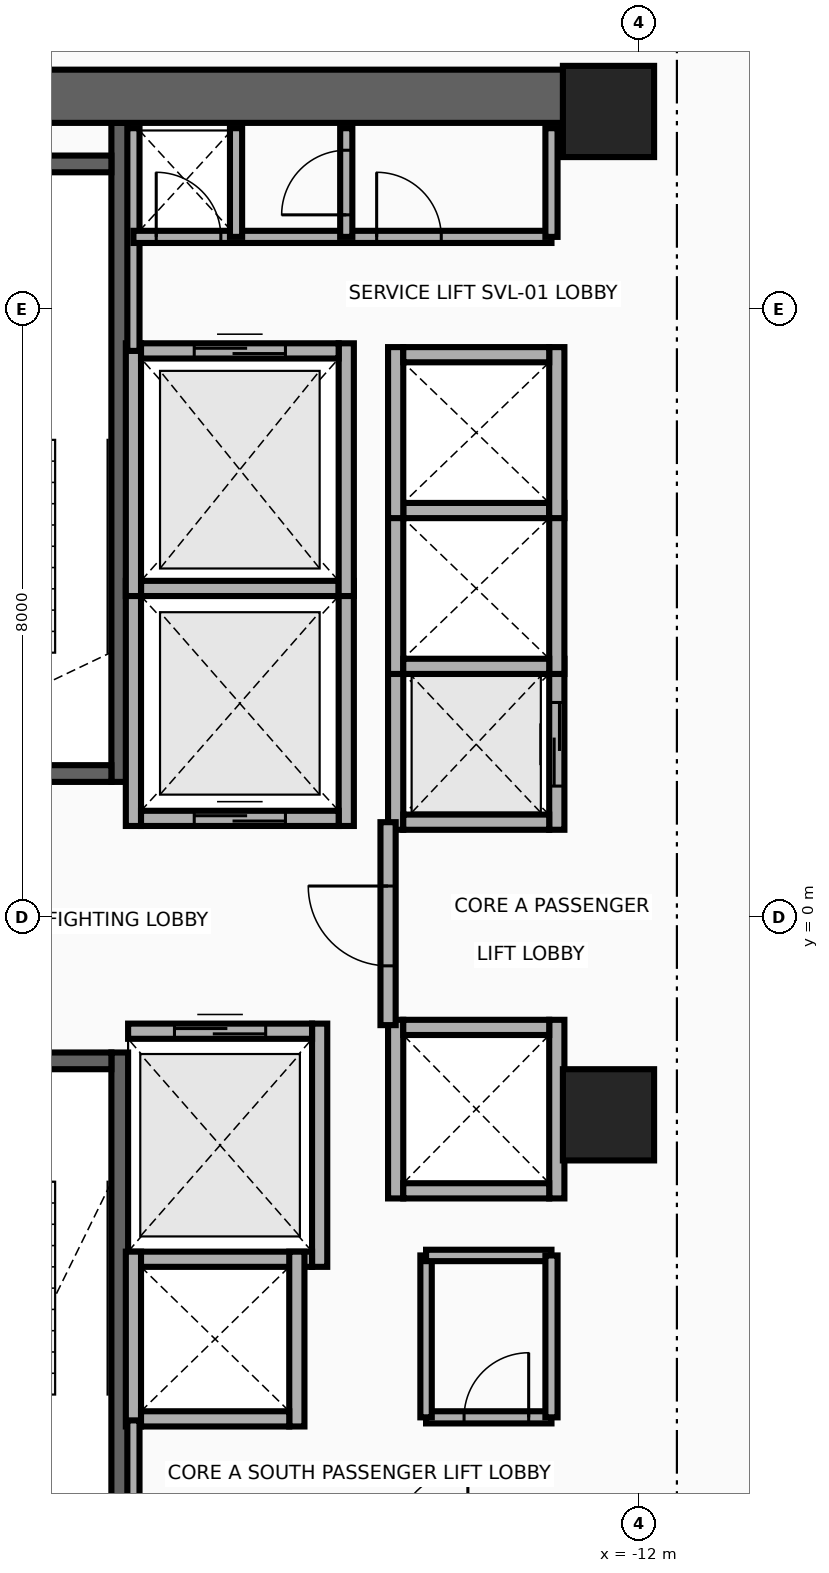
"""IFC4 building model, lengths in metres.
Left out: names, types, materials, properties, quantities, classifications, styles, units other than length and angle.
Written with IfcOpenShell. Run it as: python <this file> out.ifc"""

import sys

from ifc_helpers import new_model, si_unit, direction, frame, frame_2d, origin, origin_2d, place, context, subcontext, project, spatial, rectangle, extrude, source, transform, mapped, element, fill, save


model = new_model("IFC4")
c1 = context("Model", 3, precision=1e-05, world=origin(), true_north=direction((0.0, 1.0)))
c2 = subcontext(c1, "Body", "Model", "MODEL_VIEW")
j1 = project(units=[si_unit("LENGTHUNIT", "METRE"), si_unit("PLANEANGLEUNIT", "RADIAN")], contexts=[c1])
p1 = place(None, origin())
s1 = spatial("IfcSite", under=j1, at=p1, CompositionType="ELEMENT")
p2 = place(p1, origin())
s2 = spatial("IfcBuilding", under=s1, at=p2, CompositionType="ELEMENT")
p3 = place(p2, frame((0.0, 0.0, 150.1)))
s3 = spatial("IfcBuildingStorey", under=s2, at=p3, CompositionType="ELEMENT", Elevation=150.1)
p4 = place(p3, frame((-18.83, 1.78, 0.0), z_axis=(0.0, 0.0, 1.0), x_axis=(0.0, 1.0, 0.0)))
e1 = element("IfcWall", 1, at=p4, inside=s3, PredefinedType="SHEAR", context=c2, shape_type="SweptSolid", body=[
    extrude(rectangle(XDim=8.67, YDim=0.22, at=frame_2d((4.335, 0.0))), origin(), (0.0, 0.0, 1.0), 3.46),
])
p5 = place(p3, frame((-22.05, 1.89, 0.0), z_axis=(0.0, 0.0, 1.0), x_axis=(1.0, 0.0, 0.0)))
e2 = element("IfcWall", 2, at=p5, inside=s3, PredefinedType="SHEAR", context=c2, shape_type="SweptSolid", body=[
    extrude(rectangle(XDim=3.11, YDim=0.22, at=frame_2d((1.555, 0.0))), origin(), (0.0, 0.0, 1.0), 3.46),
])
p6 = place(p5, frame((1.0, 0.0, 0.0)))
e3 = element("IfcOpeningElement", 3, at=p6, cuts=e2, PredefinedType="OPENING", context=c2, shape_type="SweptSolid", body=[
    extrude(rectangle(XDim=1.1, YDim=2.15, at=frame_2d((0.55, 1.075))), frame((0.0, 0.125, 0.0), z_axis=(0.0, -1.0, 0.0), x_axis=(1.0, 0.0, 0.0)), (0.0, 0.0, 1.0), 0.25),
])
p7 = place(p3, frame((-22.05, 9.91, 0.0), z_axis=(0.0, 0.0, 1.0), x_axis=(1.0, 0.0, 0.0)))
e4 = element("IfcWall", 4, at=p7, inside=s3, PredefinedType="SHEAR", context=c2, shape_type="SweptSolid", body=[
    extrude(rectangle(XDim=3.11, YDim=0.22, at=frame_2d((1.555, 0.0))), origin(), (0.0, 0.0, 1.0), 3.46),
])
p8 = place(p3, frame((-18.83, -10.45, 0.0), z_axis=(0.0, 0.0, 1.0), x_axis=(0.0, 1.0, 0.0)))
e5 = element("IfcWall", 5, at=p8, inside=s3, PredefinedType="SHEAR", context=c2, shape_type="SweptSolid", body=[
    extrude(rectangle(XDim=8.67, YDim=0.22, at=frame_2d((4.335, 0.0))), origin(), (0.0, 0.0, 1.0), 3.46),
])
p9 = place(p3, frame((-22.05, -1.89, 0.0), z_axis=(0.0, 0.0, 1.0), x_axis=(1.0, 0.0, 0.0)))
e6 = element("IfcWall", 6, at=p9, inside=s3, PredefinedType="SHEAR", context=c2, shape_type="SweptSolid", body=[
    extrude(rectangle(XDim=3.11, YDim=0.22, at=frame_2d((1.555, 0.0))), origin(), (0.0, 0.0, 1.0), 3.46),
])
p10 = place(p9, frame((1.0, 0.0, 0.0)))
e7 = element("IfcOpeningElement", 7, at=p10, cuts=e6, PredefinedType="OPENING", context=c2, shape_type="SweptSolid", body=[
    extrude(rectangle(XDim=1.1, YDim=2.15, at=frame_2d((0.55, 1.075))), frame((0.0, 0.125, 0.0), z_axis=(0.0, -1.0, 0.0), x_axis=(1.0, 0.0, 0.0)), (0.0, 0.0, 1.0), 0.25),
])
p11 = place(p3, frame((-22.65, 10.8, 0.0), z_axis=(0.0, 0.0, 1.0), x_axis=(1.0, 0.0, 0.0)))
e8 = element("IfcWall", 8, at=p11, inside=s3, PredefinedType="SHEAR", context=c2, shape_type="SweptSolid", body=[
    extrude(rectangle(XDim=10.25, YDim=0.7, at=frame_2d((5.125, 0.0))), origin(), (0.0, 0.0, 1.0), 3.46),
])
m1 = source(origin(), c2, "Body", "SweptSolid", [
    extrude(rectangle(XDim=1.2, YDim=1.2, at=origin_2d()), origin(), (0.0, 0.0, 1.0), 3.7),
])
for number, where, z_axis, x_axis in (
    (9, (-12.4, -2.6, 0.0), (0.0, 0.0, 1.0), (1.0, 0.0, 0.0)),
    (10, (-12.4, 10.6, 0.0), (0.0, 0.0, 1.0), (1.0, 0.0, 0.0)),
):
    element("IfcColumn", number, at=place(p3, frame(where, z_axis=z_axis, x_axis=x_axis)), inside=s3, PredefinedType="COLUMN", context=c2, shape_type="MappedRepresentation", body=[
        mapped(m1, transform((0.0, 0.0, 0.0), x_axis=(1.0, 0.0, 0.0), y_axis=(0.0, 1.0, 0.0), z_axis=(0.0, 0.0, 1.0), scale=1.0)),
    ])
for number, where, z_axis, x_axis in (
    (11, (-18.65, 1.2, 0.0), (0.0, 0.0, 1.0), (0.0, 1.0, 0.0)),
    (12, (-15.85, 1.2, 0.0), (0.0, 0.0, 1.0), (0.0, 1.0, 0.0)),
):
    element("IfcWall", number, at=place(p3, frame(where, z_axis=z_axis, x_axis=x_axis)), inside=s3, PredefinedType="MOVABLE", context=c2, shape_type="SweptSolid", body=[
        extrude(rectangle(XDim=3.225, YDim=0.2, at=frame_2d((1.613, 0.0))), origin(), (0.0, 0.0, 1.0), 3.46),
    ])
p12 = place(p3, frame((-18.55, 1.3, 0.0), z_axis=(0.0, 0.0, 1.0), x_axis=(1.0, 0.0, 0.0)))
e13 = element("IfcWall", 13, at=p12, inside=s3, PredefinedType="MOVABLE", context=c2, shape_type="SweptSolid", body=[
    extrude(rectangle(XDim=2.6, YDim=0.2, at=frame_2d((1.3, 0.0))), origin(), (0.0, 0.0, 1.0), 3.46),
])
p13 = place(p12, frame((0.7, 0.0, 0.0)))
e14 = element("IfcOpeningElement", 14, at=p13, cuts=e13, PredefinedType="OPENING", context=c2, shape_type="SweptSolid", body=[
    extrude(rectangle(XDim=1.2, YDim=2.1, at=frame_2d((0.6, 1.05))), frame((0.0, 0.115, 0.0), z_axis=(0.0, -1.0, 0.0), x_axis=(1.0, 0.0, 0.0)), (0.0, 0.0, 1.0), 0.23),
])
p14 = place(p3, frame((-18.55, 4.325, 0.0), z_axis=(0.0, 0.0, 1.0), x_axis=(1.0, 0.0, 0.0)))
e15 = element("IfcWall", 15, at=p14, inside=s3, PredefinedType="MOVABLE", context=c2, shape_type="SweptSolid", body=[
    extrude(rectangle(XDim=2.6, YDim=0.2, at=frame_2d((1.3, 0.0))), origin(), (0.0, 0.0, 1.0), 3.46),
])
p15 = place(p3, frame((-16.2, -4.6, 0.0), z_axis=(0.0, 0.0, 1.0), x_axis=(0.0, 1.0, 0.0)))
e16 = element("IfcWall", 16, at=p15, inside=s3, PredefinedType="MOVABLE", context=c2, shape_type="SweptSolid", body=[
    extrude(rectangle(XDim=3.2, YDim=0.2, at=frame_2d((1.6, 0.0))), origin(), (0.0, 0.0, 1.0), 3.46),
])
p16 = place(p3, frame((-18.72, -4.5, 0.0), z_axis=(0.0, 0.0, 1.0), x_axis=(1.0, 0.0, 0.0)))
e17 = element("IfcWall", 17, at=p16, inside=s3, PredefinedType="MOVABLE", context=c2, shape_type="SweptSolid", body=[
    extrude(rectangle(XDim=2.42, YDim=0.2, at=frame_2d((1.21, 0.0))), origin(), (0.0, 0.0, 1.0), 3.46),
])
p17 = place(p3, frame((-18.72, -1.5, 0.0), z_axis=(0.0, 0.0, 1.0), x_axis=(1.0, 0.0, 0.0)))
e18 = element("IfcWall", 18, at=p17, inside=s3, PredefinedType="MOVABLE", context=c2, shape_type="SweptSolid", body=[
    extrude(rectangle(XDim=2.42, YDim=0.2, at=frame_2d((1.21, 0.0))), origin(), (0.0, 0.0, 1.0), 3.46),
])
p18 = place(p17, frame((0.61, 0.0, 0.0)))
e19 = element("IfcOpeningElement", 19, at=p18, cuts=e18, PredefinedType="OPENING", context=c2, shape_type="SweptSolid", body=[
    extrude(rectangle(XDim=1.2, YDim=2.1, at=frame_2d((0.6, 1.05))), frame((0.0, 0.115, 0.0), z_axis=(0.0, -1.0, 0.0), x_axis=(1.0, 0.0, 0.0)), (0.0, 0.0, 1.0), 0.23),
])
for number, where, z_axis, x_axis in (
    (20, (-18.65, 4.225, 0.0), (0.0, 0.0, 1.0), (0.0, 1.0, 0.0)),
    (21, (-15.85, 4.225, 0.0), (0.0, 0.0, 1.0), (0.0, 1.0, 0.0)),
):
    element("IfcWall", number, at=place(p3, frame(where, z_axis=z_axis, x_axis=x_axis)), inside=s3, PredefinedType="MOVABLE", context=c2, shape_type="SweptSolid", body=[
        extrude(rectangle(XDim=3.325, YDim=0.2, at=frame_2d((1.663, 0.0))), origin(), (0.0, 0.0, 1.0), 3.46),
    ])
p19 = place(p3, frame((-18.55, 7.45, 0.0), z_axis=(0.0, 0.0, 1.0), x_axis=(1.0, 0.0, 0.0)))
e22 = element("IfcWall", 22, at=p19, inside=s3, PredefinedType="MOVABLE", context=c2, shape_type="SweptSolid", body=[
    extrude(rectangle(XDim=2.6, YDim=0.2, at=frame_2d((1.3, 0.0))), origin(), (0.0, 0.0, 1.0), 3.46),
])
p20 = place(p19, frame((0.7, 0.0, 0.0)))
e23 = element("IfcOpeningElement", 23, at=p20, cuts=e22, PredefinedType="OPENING", context=c2, shape_type="SweptSolid", body=[
    extrude(rectangle(XDim=1.2, YDim=2.1, at=frame_2d((0.6, 1.05))), frame((0.0, 0.115, 0.0), z_axis=(0.0, -1.0, 0.0), x_axis=(1.0, 0.0, 0.0)), (0.0, 0.0, 1.0), 0.23),
])
p21 = place(p3, frame((-15.2, 1.15, 0.0), z_axis=(0.0, 0.0, 1.0), x_axis=(0.0, 1.0, 0.0)))
e24 = element("IfcWall", 24, at=p21, inside=s3, PredefinedType="MOVABLE", context=c2, shape_type="SweptSolid", body=[
    extrude(rectangle(XDim=2.25, YDim=0.2, at=frame_2d((1.125, 0.0))), origin(), (0.0, 0.0, 1.0), 3.46),
])
p22 = place(p3, frame((-13.08, 1.15, 0.0), z_axis=(0.0, 0.0, 1.0), x_axis=(0.0, 1.0, 0.0)))
e25 = element("IfcWall", 25, at=p22, inside=s3, PredefinedType="MOVABLE", context=c2, shape_type="SweptSolid", body=[
    extrude(rectangle(XDim=2.25, YDim=0.2, at=frame_2d((1.125, 0.0))), origin(), (0.0, 0.0, 1.0), 3.46),
])
p23 = place(p22, frame((0.575, 0.0, 0.0)))
e26 = element("IfcOpeningElement", 26, at=p23, cuts=e25, PredefinedType="OPENING", context=c2, shape_type="SweptSolid", body=[
    extrude(rectangle(XDim=1.1, YDim=2.1, at=frame_2d((0.55, 1.05))), frame((0.0, 0.115, 0.0), z_axis=(0.0, -1.0, 0.0), x_axis=(1.0, 0.0, 0.0)), (0.0, 0.0, 1.0), 0.23),
])
p24 = place(p3, frame((-15.1, 1.25, 0.0), z_axis=(0.0, 0.0, 1.0), x_axis=(1.0, 0.0, 0.0)))
e27 = element("IfcWall", 27, at=p24, inside=s3, PredefinedType="MOVABLE", context=c2, shape_type="SweptSolid", body=[
    extrude(rectangle(XDim=1.92, YDim=0.2, at=frame_2d((0.96, 0.0))), origin(), (0.0, 0.0, 1.0), 3.46),
])
for number, where, z_axis, x_axis in (
    (28, (-15.2, 3.2, 0.0), (0.0, 0.0, 1.0), (0.0, 1.0, 0.0)),
    (29, (-13.08, 3.2, 0.0), (0.0, 0.0, 1.0), (0.0, 1.0, 0.0)),
):
    element("IfcWall", number, at=place(p3, frame(where, z_axis=z_axis, x_axis=x_axis)), inside=s3, PredefinedType="MOVABLE", context=c2, shape_type="SweptSolid", body=[
        extrude(rectangle(XDim=2.25, YDim=0.2, at=frame_2d((1.125, 0.0))), origin(), (0.0, 0.0, 1.0), 3.46),
    ])
for number, where, z_axis, x_axis in (
    (30, (-15.1, 3.3, 0.0), (0.0, 0.0, 1.0), (1.0, 0.0, 0.0)),
    (31, (-15.1, 5.35, 0.0), (0.0, 0.0, 1.0), (1.0, 0.0, 0.0)),
):
    element("IfcWall", number, at=place(p3, frame(where, z_axis=z_axis, x_axis=x_axis)), inside=s3, PredefinedType="MOVABLE", context=c2, shape_type="SweptSolid", body=[
        extrude(rectangle(XDim=1.92, YDim=0.2, at=frame_2d((0.96, 0.0))), origin(), (0.0, 0.0, 1.0), 3.46),
    ])
for number, where, z_axis, x_axis in (
    (32, (-15.2, 5.25, 0.0), (0.0, 0.0, 1.0), (0.0, 1.0, 0.0)),
    (33, (-13.08, 5.25, 0.0), (0.0, 0.0, 1.0), (0.0, 1.0, 0.0)),
):
    element("IfcWall", number, at=place(p3, frame(where, z_axis=z_axis, x_axis=x_axis)), inside=s3, PredefinedType="MOVABLE", context=c2, shape_type="SweptSolid", body=[
        extrude(rectangle(XDim=2.25, YDim=0.2, at=frame_2d((1.125, 0.0))), origin(), (0.0, 0.0, 1.0), 3.46),
    ])
p25 = place(p3, frame((-15.1, 7.4, 0.0), z_axis=(0.0, 0.0, 1.0), x_axis=(1.0, 0.0, 0.0)))
e34 = element("IfcWall", 34, at=p25, inside=s3, PredefinedType="MOVABLE", context=c2, shape_type="SweptSolid", body=[
    extrude(rectangle(XDim=1.92, YDim=0.2, at=frame_2d((0.96, 0.0))), origin(), (0.0, 0.0, 1.0), 3.46),
])
for number, where, z_axis, x_axis in (
    (35, (-18.65, -6.7, 0.0), (0.0, 0.0, 1.0), (0.0, 1.0, 0.0)),
    (36, (-16.5, -6.7, 0.0), (0.0, 0.0, 1.0), (0.0, 1.0, 0.0)),
):
    element("IfcWall", number, at=place(p3, frame(where, z_axis=z_axis, x_axis=x_axis)), inside=s3, PredefinedType="MOVABLE", context=c2, shape_type="SweptSolid", body=[
        extrude(rectangle(XDim=2.3, YDim=0.2, at=frame_2d((1.15, 0.0))), origin(), (0.0, 0.0, 1.0), 3.46),
    ])
p26 = place(p3, frame((-18.55, -6.6, 0.0), z_axis=(0.0, 0.0, 1.0), x_axis=(1.0, 0.0, 0.0)))
e37 = element("IfcWall", 37, at=p26, inside=s3, PredefinedType="MOVABLE", context=c2, shape_type="SweptSolid", body=[
    extrude(rectangle(XDim=1.95, YDim=0.2, at=frame_2d((0.975, 0.0))), origin(), (0.0, 0.0, 1.0), 3.46),
])
for number, where, z_axis, x_axis in (
    (38, (-15.2, -3.7, 0.0), (0.0, 0.0, 1.0), (0.0, 1.0, 0.0)),
    (39, (-13.08, -3.7, 0.0), (0.0, 0.0, 1.0), (0.0, 1.0, 0.0)),
):
    element("IfcWall", number, at=place(p3, frame(where, z_axis=z_axis, x_axis=x_axis)), inside=s3, PredefinedType="MOVABLE", context=c2, shape_type="SweptSolid", body=[
        extrude(rectangle(XDim=2.35, YDim=0.2, at=frame_2d((1.175, 0.0))), origin(), (0.0, 0.0, 1.0), 3.46),
    ])
for number, where, z_axis, x_axis in (
    (40, (-15.1, -3.6, 0.0), (0.0, 0.0, 1.0), (1.0, 0.0, 0.0)),
    (41, (-15.1, -1.45, 0.0), (0.0, 0.0, 1.0), (1.0, 0.0, 0.0)),
):
    element("IfcWall", number, at=place(p3, frame(where, z_axis=z_axis, x_axis=x_axis)), inside=s3, PredefinedType="MOVABLE", context=c2, shape_type="SweptSolid", body=[
        extrude(rectangle(XDim=1.92, YDim=0.2, at=frame_2d((0.96, 0.0))), origin(), (0.0, 0.0, 1.0), 3.46),
    ])
p27 = place(p3, frame((-15.3, -1.42, 0.0), z_axis=(0.0, 0.0, 1.0), x_axis=(0.0, 1.0, 0.0)))
e42 = element("IfcWall", 42, at=p27, inside=s3, PredefinedType="PARTITIONING", context=c2, shape_type="SweptSolid", body=[
    extrude(rectangle(XDim=2.67, YDim=0.2, at=frame_2d((1.335, 0.0))), origin(), (0.0, 0.0, 1.0), 3.46),
])
p28 = place(p27, frame((0.78, 0.0, 0.0)))
e43 = element("IfcOpeningElement", 43, at=p28, cuts=e42, PredefinedType="OPENING", context=c2, shape_type="SweptSolid", body=[
    extrude(rectangle(XDim=1.05, YDim=2.15, at=frame_2d((0.525, 1.075))), frame((0.0, 0.115, 0.0), z_axis=(0.0, -1.0, 0.0), x_axis=(1.0, 0.0, 0.0)), (0.0, 0.0, 1.0), 0.23),
])
p29 = place(p3, frame((-18.65, 7.45, 0.0), z_axis=(0.0, 0.0, 1.0), x_axis=(0.0, 1.0, 0.0)))
e44 = element("IfcWall", 44, at=p29, inside=s3, PredefinedType="PARTITIONING", context=c2, shape_type="SweptSolid", body=[
    extrude(rectangle(XDim=2.93, YDim=0.16, at=frame_2d((1.465, 0.0))), origin(), (0.0, 0.0, 1.0), 3.46),
])
p30 = place(p3, frame((-18.65, -8.18, 0.0), z_axis=(0.0, 0.0, 1.0), x_axis=(0.0, 1.0, 0.0)))
e45 = element("IfcWall", 45, at=p30, inside=s3, PredefinedType="PARTITIONING", context=c2, shape_type="SweptSolid", body=[
    extrude(rectangle(XDim=1.56, YDim=0.16, at=frame_2d((0.78, 0.0))), origin(), (0.0, 0.0, 1.0), 3.46),
])
p31 = place(p3, frame((-18.65, 8.95, 0.0), z_axis=(0.0, 0.0, 1.0), x_axis=(1.0, 0.0, 0.0)))
e46 = element("IfcWall", 46, at=p31, inside=s3, PredefinedType="PARTITIONING", context=c2, shape_type="SweptSolid", body=[
    extrude(rectangle(XDim=5.5, YDim=0.16, at=frame_2d((2.75, 0.0))), origin(), (0.0, 0.0, 1.0), 3.46),
])
p32 = place(p31, frame((0.3, 0.0, 0.0)))
e47 = element("IfcOpeningElement", 47, at=p32, cuts=e46, PredefinedType="OPENING", context=c2, shape_type="SweptSolid", body=[
    extrude(rectangle(XDim=0.85, YDim=2.05, at=frame_2d((0.425, 1.025))), frame((0.0, 0.095, 0.0), z_axis=(0.0, -1.0, 0.0), x_axis=(1.0, 0.0, 0.0)), (0.0, 0.0, 1.0), 0.19),
])
p33 = place(p31, frame((3.2, 0.0, 0.0)))
e48 = element("IfcOpeningElement", 48, at=p33, cuts=e46, PredefinedType="OPENING", context=c2, shape_type="SweptSolid", body=[
    extrude(rectangle(XDim=0.85, YDim=2.05, at=frame_2d((0.425, 1.025))), frame((0.0, 0.095, 0.0), z_axis=(0.0, -1.0, 0.0), x_axis=(1.0, 0.0, 0.0)), (0.0, 0.0, 1.0), 0.19),
])
for number, where, z_axis, x_axis in (
    (49, (-13.15, 8.95, 0.0), (0.0, 0.0, 1.0), (0.0, 1.0, 0.0)),
    (50, (-17.3, 8.95, 0.0), (0.0, 0.0, 1.0), (0.0, 1.0, 0.0)),
):
    element("IfcWall", number, at=place(p3, frame(where, z_axis=z_axis, x_axis=x_axis)), inside=s3, PredefinedType="PARTITIONING", context=c2, shape_type="SweptSolid", body=[
        extrude(rectangle(XDim=1.43, YDim=0.16, at=frame_2d((0.715, 0.0))), origin(), (0.0, 0.0, 1.0), 3.46),
    ])
p34 = place(p3, frame((-15.85, 8.95, 0.0), z_axis=(0.0, 0.0, 1.0), x_axis=(0.0, 1.0, 0.0)))
e51 = element("IfcWall", 51, at=p34, inside=s3, PredefinedType="PARTITIONING", context=c2, shape_type="SweptSolid", body=[
    extrude(rectangle(XDim=1.43, YDim=0.16, at=frame_2d((0.715, 0.0))), origin(), (0.0, 0.0, 1.0), 3.46),
])
p35 = place(p34, frame((0.29, 0.0, 0.0)))
e52 = element("IfcOpeningElement", 52, at=p35, cuts=e51, PredefinedType="OPENING", context=c2, shape_type="SweptSolid", body=[
    extrude(rectangle(XDim=0.85, YDim=2.05, at=frame_2d((0.425, 1.025))), frame((0.0, 0.095, 0.0), z_axis=(0.0, -1.0, 0.0), x_axis=(1.0, 0.0, 0.0)), (0.0, 0.0, 1.0), 0.19),
])
p36 = place(p3, frame((-14.8, -6.58, 0.0), z_axis=(0.0, 0.0, 1.0), x_axis=(1.0, 0.0, 0.0)))
e53 = element("IfcWall", 53, at=p36, inside=s3, PredefinedType="PARTITIONING", context=c2, shape_type="SweptSolid", body=[
    extrude(rectangle(XDim=1.65, YDim=0.16, at=frame_2d((0.825, 0.0))), origin(), (0.0, 0.0, 1.0), 3.46),
])
p37 = place(p36, frame((0.5, 0.0, 0.0)))
e54 = element("IfcOpeningElement", 54, at=p37, cuts=e53, PredefinedType="OPENING", context=c2, shape_type="SweptSolid", body=[
    extrude(rectangle(XDim=0.85, YDim=2.05, at=frame_2d((0.425, 1.025))), frame((0.0, 0.095, 0.0), z_axis=(0.0, -1.0, 0.0), x_axis=(1.0, 0.0, 0.0)), (0.0, 0.0, 1.0), 0.19),
])
p38 = place(p3, frame((-14.8, -6.58, 0.0), z_axis=(0.0, 0.0, 1.0), x_axis=(0.0, 1.0, 0.0)))
e55 = element("IfcWall", 55, at=p38, inside=s3, PredefinedType="PARTITIONING", context=c2, shape_type="SweptSolid", body=[
    extrude(rectangle(XDim=2.13, YDim=0.15, at=frame_2d((1.065, 0.0))), origin(), (0.0, 0.0, 1.0), 3.46),
])
p39 = place(p3, frame((-14.8, -4.45, 0.0), z_axis=(0.0, 0.0, 1.0), x_axis=(1.0, 0.0, 0.0)))
e56 = element("IfcWall", 56, at=p39, inside=s3, PredefinedType="PARTITIONING", context=c2, shape_type="SweptSolid", body=[
    extrude(rectangle(XDim=1.65, YDim=0.15, at=frame_2d((0.825, 0.0))), origin(), (0.0, 0.0, 1.0), 3.46),
])
p40 = place(p3, frame((-13.15, -6.58, 0.0), z_axis=(0.0, 0.0, 1.0), x_axis=(0.0, 1.0, 0.0)))
e57 = element("IfcWall", 57, at=p40, inside=s3, PredefinedType="PARTITIONING", context=c2, shape_type="SweptSolid", body=[
    extrude(rectangle(XDim=2.13, YDim=0.16, at=frame_2d((1.065, 0.0))), origin(), (0.0, 0.0, 1.0), 3.46),
])
p41 = place(p13, origin())
e58 = element("IfcDoor", 58, at=p41, inside=s3, OperationType="DOUBLE_DOOR_SLIDING", PredefinedType="DOOR", context=c2, shape_type="SweptSolid", body=[
    extrude(rectangle(XDim=1.2, YDim=2.1, at=frame_2d((0.6, 1.05))), frame((0.0, 0.025, 0.0), z_axis=(0.0, -1.0, 0.0), x_axis=(1.0, 0.0, 0.0)), (0.0, 0.0, 1.0), 0.05),
])
fill(e14, e58)
p42 = place(p18, origin())
e59 = element("IfcDoor", 59, at=p42, inside=s3, OperationType="DOUBLE_DOOR_SLIDING", PredefinedType="DOOR", context=c2, shape_type="SweptSolid", body=[
    extrude(rectangle(XDim=1.2, YDim=2.1, at=frame_2d((0.6, 1.05))), frame((0.0, 0.025, 0.0), z_axis=(0.0, -1.0, 0.0), x_axis=(1.0, 0.0, 0.0)), (0.0, 0.0, 1.0), 0.05),
])
fill(e19, e59)
p43 = place(p20, origin())
e60 = element("IfcDoor", 60, at=p43, inside=s3, OperationType="DOUBLE_DOOR_SLIDING", PredefinedType="DOOR", context=c2, shape_type="SweptSolid", body=[
    extrude(rectangle(XDim=1.2, YDim=2.1, at=frame_2d((0.6, 1.05))), frame((0.0, 0.025, 0.0), z_axis=(0.0, -1.0, 0.0), x_axis=(1.0, 0.0, 0.0)), (0.0, 0.0, 1.0), 0.05),
])
fill(e23, e60)
p44 = place(p23, origin())
e61 = element("IfcDoor", 61, at=p44, inside=s3, OperationType="DOUBLE_DOOR_SLIDING", PredefinedType="DOOR", context=c2, shape_type="SweptSolid", body=[
    extrude(rectangle(XDim=1.1, YDim=2.1, at=frame_2d((0.55, 1.05))), frame((0.0, 0.025, 0.0), z_axis=(0.0, -1.0, 0.0), x_axis=(1.0, 0.0, 0.0)), (0.0, 0.0, 1.0), 0.05),
])
fill(e26, e61)
p45 = place(p28, origin())
e62 = element("IfcDoor", 62, at=p45, inside=s3, OperationType="SINGLE_SWING_RIGHT", PredefinedType="DOOR", context=c2, shape_type="SweptSolid", body=[
    extrude(rectangle(XDim=1.05, YDim=2.15, at=frame_2d((0.525, 1.075))), frame((0.0, 0.025, 0.0), z_axis=(0.0, -1.0, 0.0), x_axis=(1.0, 0.0, 0.0)), (0.0, 0.0, 1.0), 0.05),
])
fill(e43, e62)
p46 = place(p32, origin())
e63 = element("IfcDoor", 63, at=p46, inside=s3, OperationType="SINGLE_SWING_LEFT", PredefinedType="DOOR", context=c2, shape_type="SweptSolid", body=[
    extrude(rectangle(XDim=0.85, YDim=2.05, at=frame_2d((0.425, 1.025))), frame((0.0, 0.025, 0.0), z_axis=(0.0, -1.0, 0.0), x_axis=(1.0, 0.0, 0.0)), (0.0, 0.0, 1.0), 0.05),
])
fill(e47, e63)
p47 = place(p33, origin())
e64 = element("IfcDoor", 64, at=p47, inside=s3, OperationType="SINGLE_SWING_RIGHT", PredefinedType="DOOR", context=c2, shape_type="SweptSolid", body=[
    extrude(rectangle(XDim=0.85, YDim=2.05, at=frame_2d((0.425, 1.025))), frame((0.0, 0.025, 0.0), z_axis=(0.0, -1.0, 0.0), x_axis=(1.0, 0.0, 0.0)), (0.0, 0.0, 1.0), 0.05),
])
fill(e48, e64)
p48 = place(p35, origin())
e65 = element("IfcDoor", 65, at=p48, inside=s3, OperationType="SINGLE_SWING_LEFT", PredefinedType="DOOR", context=c2, shape_type="SweptSolid", body=[
    extrude(rectangle(XDim=0.85, YDim=2.05, at=frame_2d((0.425, 1.025))), frame((0.0, 0.025, 0.0), z_axis=(0.0, -1.0, 0.0), x_axis=(1.0, 0.0, 0.0)), (0.0, 0.0, 1.0), 0.05),
])
fill(e52, e65)
p49 = place(p37, origin())
e66 = element("IfcDoor", 66, at=p49, inside=s3, OperationType="SINGLE_SWING_LEFT", PredefinedType="DOOR", context=c2, shape_type="SweptSolid", body=[
    extrude(rectangle(XDim=0.85, YDim=2.05, at=frame_2d((0.425, 1.025))), frame((0.0, 0.025, 0.0), z_axis=(0.0, -1.0, 0.0), x_axis=(1.0, 0.0, 0.0)), (0.0, 0.0, 1.0), 0.05),
])
fill(e54, e66)
save(model, sys.argv[1])
